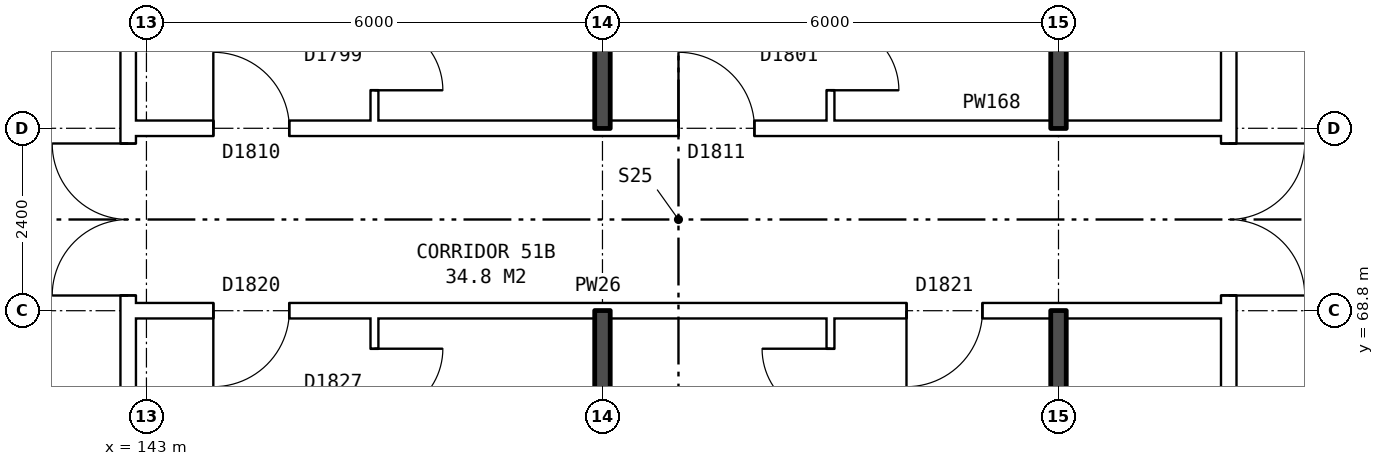
"""IFC4 building model, lengths in metres.
Left out: names, types, materials, properties, quantities, classifications, styles, units other than length and angle.
Written with IfcOpenShell. Run it as: python <this file> out.ifc"""

import sys

from ifc_helpers import new_model, si_unit, direction, frame, frame_2d, origin, place, context, subcontext, project, spatial, rectangle, extrude, element, fill, save


model = new_model("IFC4")
c1 = context("Model", 3, precision=1e-05, world=origin(), true_north=direction((0.0, 1.0)))
c2 = subcontext(c1, "Body", "Model", "MODEL_VIEW")
j1 = project(units=[si_unit("LENGTHUNIT", "METRE"), si_unit("PLANEANGLEUNIT", "RADIAN")], contexts=[c1])
p1 = place(None, origin())
s1 = spatial("IfcSite", under=j1, at=p1, CompositionType="ELEMENT")
p2 = place(p1, origin())
s2 = spatial("IfcBuilding", under=s1, at=p2, CompositionType="ELEMENT")
p3 = place(p2, frame((0.0, 0.0, 182.0)))
s3 = spatial("IfcBuildingStorey", under=s2, at=p3, CompositionType="ELEMENT", Elevation=182.0)
p4 = place(p3, frame((142.76, 63.9, 0.0), z_axis=(0.0, 0.0, 1.0), x_axis=(0.0, 1.0, 0.0)))
e1 = element("IfcWall", 1, at=p4, inside=s3, PredefinedType="PARTITIONING", context=c2, shape_type="SweptSolid", body=[
    extrude(rectangle(XDim=12.2, YDim=0.2, at=frame_2d((6.1, 0.0))), origin(), (0.0, 0.0, 1.0), 2.85),
])
p5 = place(p4, frame((5.1, 0.0, 0.0)))
e2 = element("IfcOpeningElement", 2, at=p5, cuts=e1, PredefinedType="OPENING", context=c2, shape_type="SweptSolid", body=[
    extrude(rectangle(XDim=2.0, YDim=2.1, at=frame_2d((1.0, 1.05))), frame((0.0, 0.11, 0.0), z_axis=(0.0, -1.0, 0.0), x_axis=(1.0, 0.0, 0.0)), (0.0, 0.0, 1.0), 0.22),
])
p6 = place(p3, frame((157.24, 63.9, 0.0), z_axis=(0.0, 0.0, 1.0), x_axis=(0.0, 1.0, 0.0)))
e3 = element("IfcWall", 3, at=p6, inside=s3, PredefinedType="PARTITIONING", context=c2, shape_type="SweptSolid", body=[
    extrude(rectangle(XDim=12.2, YDim=0.2, at=frame_2d((6.1, 0.0))), origin(), (0.0, 0.0, 1.0), 2.85),
])
p7 = place(p6, frame((5.1, 0.0, 0.0)))
e4 = element("IfcOpeningElement", 4, at=p7, cuts=e3, PredefinedType="OPENING", context=c2, shape_type="SweptSolid", body=[
    extrude(rectangle(XDim=2.0, YDim=2.1, at=frame_2d((1.0, 1.05))), frame((0.0, 0.11, 0.0), z_axis=(0.0, -1.0, 0.0), x_axis=(1.0, 0.0, 0.0)), (0.0, 0.0, 1.0), 0.22),
])
p8 = place(p3, frame((142.76, 68.8, 0.0), z_axis=(0.0, 0.0, 1.0), x_axis=(1.0, 0.0, 0.0)))
e5 = element("IfcWall", 5, at=p8, inside=s3, PredefinedType="PARTITIONING", context=c2, shape_type="SweptSolid", body=[
    extrude(rectangle(XDim=14.48, YDim=0.2, at=frame_2d((7.24, 0.0))), origin(), (0.0, 0.0, 1.0), 2.85),
])
p9 = place(p8, frame((1.12, 0.0, 0.0)))
e6 = element("IfcOpeningElement", 6, at=p9, cuts=e5, PredefinedType="OPENING", context=c2, shape_type="SweptSolid", body=[
    extrude(rectangle(XDim=1.0, YDim=2.1, at=frame_2d((0.5, 1.05))), frame((0.0, 0.11, 0.0), z_axis=(0.0, -1.0, 0.0), x_axis=(1.0, 0.0, 0.0)), (0.0, 0.0, 1.0), 0.22),
])
p10 = place(p8, frame((10.24, 0.0, 0.0)))
e7 = element("IfcOpeningElement", 7, at=p10, cuts=e5, PredefinedType="OPENING", context=c2, shape_type="SweptSolid", body=[
    extrude(rectangle(XDim=1.0, YDim=2.1, at=frame_2d((0.5, 1.05))), frame((0.0, 0.11, 0.0), z_axis=(0.0, -1.0, 0.0), x_axis=(1.0, 0.0, 0.0)), (0.0, 0.0, 1.0), 0.22),
])
p11 = place(p3, frame((142.76, 71.2, 0.0), z_axis=(0.0, 0.0, 1.0), x_axis=(1.0, 0.0, 0.0)))
e8 = element("IfcWall", 8, at=p11, inside=s3, PredefinedType="PARTITIONING", context=c2, shape_type="SweptSolid", body=[
    extrude(rectangle(XDim=14.48, YDim=0.2, at=frame_2d((7.24, 0.0))), origin(), (0.0, 0.0, 1.0), 2.85),
])
p12 = place(p11, frame((1.12, 0.0, 0.0)))
e9 = element("IfcOpeningElement", 9, at=p12, cuts=e8, PredefinedType="OPENING", context=c2, shape_type="SweptSolid", body=[
    extrude(rectangle(XDim=1.0, YDim=2.1, at=frame_2d((0.5, 1.05))), frame((0.0, 0.11, 0.0), z_axis=(0.0, -1.0, 0.0), x_axis=(1.0, 0.0, 0.0)), (0.0, 0.0, 1.0), 0.22),
])
p13 = place(p11, frame((7.24, 0.0, 0.0)))
e10 = element("IfcOpeningElement", 10, at=p13, cuts=e8, PredefinedType="OPENING", context=c2, shape_type="SweptSolid", body=[
    extrude(rectangle(XDim=1.0, YDim=2.1, at=frame_2d((0.5, 1.05))), frame((0.0, 0.11, 0.0), z_axis=(0.0, -1.0, 0.0), x_axis=(1.0, 0.0, 0.0)), (0.0, 0.0, 1.0), 0.22),
])
p14 = place(p3, frame((146.0, 54.36, 0.0), z_axis=(0.0, 0.0, 1.0), x_axis=(0.0, 1.0, 0.0)))
e11 = element("IfcWall", 11, at=p14, inside=s3, PredefinedType="PARTITIONING", context=c2, shape_type="SweptSolid", body=[
    extrude(rectangle(XDim=14.34, YDim=0.1, at=frame_2d((7.17, 0.0))), origin(), (0.0, 0.0, 1.0), 2.85),
])
p15 = place(p14, frame((7.7, 0.0, 0.0)))
e12 = element("IfcOpeningElement", 12, at=p15, cuts=e11, PredefinedType="OPENING", context=c2, shape_type="SweptSolid", body=[
    extrude(rectangle(XDim=0.9, YDim=2.1, at=frame_2d((0.45, 1.05))), frame((0.0, 0.06, 0.0), z_axis=(0.0, -1.0, 0.0), x_axis=(1.0, 0.0, 0.0)), (0.0, 0.0, 1.0), 0.12),
])
p16 = place(p14, frame((13.04, 0.0, 0.0)))
e13 = element("IfcOpeningElement", 13, at=p16, cuts=e11, PredefinedType="OPENING", context=c2, shape_type="SweptSolid", body=[
    extrude(rectangle(XDim=0.9, YDim=2.1, at=frame_2d((0.45, 1.05))), frame((0.0, 0.06, 0.0), z_axis=(0.0, -1.0, 0.0), x_axis=(1.0, 0.0, 0.0)), (0.0, 0.0, 1.0), 0.12),
])
p17 = place(p3, frame((146.0, 71.3, 0.0), z_axis=(0.0, 0.0, 1.0), x_axis=(0.0, 1.0, 0.0)))
e14 = element("IfcWall", 14, at=p17, inside=s3, PredefinedType="PARTITIONING", context=c2, shape_type="SweptSolid", body=[
    extrude(rectangle(XDim=14.34, YDim=0.1, at=frame_2d((7.17, 0.0))), origin(), (0.0, 0.0, 1.0), 2.85),
])
p18 = place(p17, frame((5.74, 0.0, 0.0)))
e15 = element("IfcOpeningElement", 15, at=p18, cuts=e14, PredefinedType="OPENING", context=c2, shape_type="SweptSolid", body=[
    extrude(rectangle(XDim=0.9, YDim=2.1, at=frame_2d((0.45, 1.05))), frame((0.0, 0.06, 0.0), z_axis=(0.0, -1.0, 0.0), x_axis=(1.0, 0.0, 0.0)), (0.0, 0.0, 1.0), 0.12),
])
p19 = place(p17, frame((0.4, 0.0, 0.0)))
e16 = element("IfcOpeningElement", 16, at=p19, cuts=e14, PredefinedType="OPENING", context=c2, shape_type="SweptSolid", body=[
    extrude(rectangle(XDim=0.9, YDim=2.1, at=frame_2d((0.45, 1.05))), frame((0.0, 0.06, 0.0), z_axis=(0.0, -1.0, 0.0), x_axis=(1.0, 0.0, 0.0)), (0.0, 0.0, 1.0), 0.12),
])
for number, where, z_axis, x_axis in (
    (17, (149.0, 54.36, 0.0), (0.0, 0.0, 1.0), (0.0, 1.0, 0.0)),
    (18, (149.0, 71.2, 0.0), (0.0, 0.0, 1.0), (0.0, 1.0, 0.0)),
):
    element("IfcWall", number, at=place(p3, frame(where, z_axis=z_axis, x_axis=x_axis)), inside=s3, PredefinedType="SOLIDWALL", context=c2, shape_type="SweptSolid", body=[
        extrude(rectangle(XDim=14.44, YDim=0.2, at=frame_2d((7.22, 0.0))), origin(), (0.0, 0.0, 1.0), 2.85),
    ])
p20 = place(p3, frame((152.0, 54.36, 0.0), z_axis=(0.0, 0.0, 1.0), x_axis=(0.0, 1.0, 0.0)))
e19 = element("IfcWall", 19, at=p20, inside=s3, PredefinedType="PARTITIONING", context=c2, shape_type="SweptSolid", body=[
    extrude(rectangle(XDim=14.34, YDim=0.1, at=frame_2d((7.17, 0.0))), origin(), (0.0, 0.0, 1.0), 2.85),
])
p21 = place(p20, frame((5.5, 0.0, 0.0)))
e20 = element("IfcOpeningElement", 20, at=p21, cuts=e19, PredefinedType="OPENING", context=c2, shape_type="SweptSolid", body=[
    extrude(rectangle(XDim=0.9, YDim=2.1, at=frame_2d((0.45, 1.05))), frame((0.0, 0.06, 0.0), z_axis=(0.0, -1.0, 0.0), x_axis=(1.0, 0.0, 0.0)), (0.0, 0.0, 1.0), 0.12),
])
p22 = place(p20, frame((13.04, 0.0, 0.0)))
e21 = element("IfcOpeningElement", 21, at=p22, cuts=e19, PredefinedType="OPENING", context=c2, shape_type="SweptSolid", body=[
    extrude(rectangle(XDim=0.9, YDim=2.1, at=frame_2d((0.45, 1.05))), frame((0.0, 0.06, 0.0), z_axis=(0.0, -1.0, 0.0), x_axis=(1.0, 0.0, 0.0)), (0.0, 0.0, 1.0), 0.12),
])
p23 = place(p3, frame((152.0, 71.3, 0.0), z_axis=(0.0, 0.0, 1.0), x_axis=(0.0, 1.0, 0.0)))
e22 = element("IfcWall", 22, at=p23, inside=s3, PredefinedType="PARTITIONING", context=c2, shape_type="SweptSolid", body=[
    extrude(rectangle(XDim=14.34, YDim=0.1, at=frame_2d((7.17, 0.0))), origin(), (0.0, 0.0, 1.0), 2.85),
])
p24 = place(p23, frame((6.74, 0.0, 0.0)))
e23 = element("IfcOpeningElement", 23, at=p24, cuts=e22, PredefinedType="OPENING", context=c2, shape_type="SweptSolid", body=[
    extrude(rectangle(XDim=0.9, YDim=2.1, at=frame_2d((0.45, 1.05))), frame((0.0, 0.06, 0.0), z_axis=(0.0, -1.0, 0.0), x_axis=(1.0, 0.0, 0.0)), (0.0, 0.0, 1.0), 0.12),
])
p25 = place(p23, frame((0.4, 0.0, 0.0)))
e24 = element("IfcOpeningElement", 24, at=p25, cuts=e22, PredefinedType="OPENING", context=c2, shape_type="SweptSolid", body=[
    extrude(rectangle(XDim=0.9, YDim=2.1, at=frame_2d((0.45, 1.05))), frame((0.0, 0.06, 0.0), z_axis=(0.0, -1.0, 0.0), x_axis=(1.0, 0.0, 0.0)), (0.0, 0.0, 1.0), 0.12),
])
for number, where, z_axis, x_axis in (
    (25, (155.0, 63.8, 0.0), (0.0, 0.0, 1.0), (0.0, 1.0, 0.0)),
    (26, (155.0, 71.2, 0.0), (0.0, 0.0, 1.0), (0.0, 1.0, 0.0)),
):
    element("IfcWall", number, at=place(p3, frame(where, z_axis=z_axis, x_axis=x_axis)), inside=s3, PredefinedType="SOLIDWALL", context=c2, shape_type="SweptSolid", body=[
        extrude(rectangle(XDim=5.0, YDim=0.2, at=frame_2d((2.5, 0.0))), origin(), (0.0, 0.0, 1.0), 2.85),
    ])
p26 = place(p5, origin())
e27 = element("IfcDoor", 27, at=p26, inside=s3, OperationType="DOUBLE_DOOR_SINGLE_SWING", PredefinedType="DOOR", context=c2, shape_type="SweptSolid", body=[
    extrude(rectangle(XDim=2.0, YDim=2.1, at=frame_2d((1.0, 1.05))), frame((0.0, 0.025, 0.0), z_axis=(0.0, -1.0, 0.0), x_axis=(1.0, 0.0, 0.0)), (0.0, 0.0, 1.0), 0.05),
])
fill(e2, e27)
p27 = place(p7, frame((2.0, 0.0, 0.0), z_axis=(0.0, 0.0, 1.0), x_axis=(-1.0, 0.0, 0.0)))
e28 = element("IfcDoor", 28, at=p27, inside=s3, OperationType="DOUBLE_DOOR_SINGLE_SWING", PredefinedType="DOOR", context=c2, shape_type="SweptSolid", body=[
    extrude(rectangle(XDim=2.0, YDim=2.1, at=frame_2d((1.0, 1.05))), frame((0.0, 0.025, 0.0), z_axis=(0.0, -1.0, 0.0), x_axis=(1.0, 0.0, 0.0)), (0.0, 0.0, 1.0), 0.05),
])
fill(e4, e28)
p28 = place(p9, frame((1.0, 0.0, 0.0), z_axis=(0.0, 0.0, 1.0), x_axis=(-1.0, 0.0, 0.0)))
e29 = element("IfcDoor", 29, at=p28, inside=s3, OperationType="SINGLE_SWING_RIGHT", PredefinedType="DOOR", context=c2, shape_type="SweptSolid", body=[
    extrude(rectangle(XDim=1.0, YDim=2.1, at=frame_2d((0.5, 1.05))), frame((0.0, 0.025, 0.0), z_axis=(0.0, -1.0, 0.0), x_axis=(1.0, 0.0, 0.0)), (0.0, 0.0, 1.0), 0.05),
])
fill(e6, e29)
p29 = place(p16, frame((0.9, 0.0, 0.0), z_axis=(0.0, 0.0, 1.0), x_axis=(-1.0, 0.0, 0.0)))
e30 = element("IfcDoor", 30, at=p29, inside=s3, OperationType="SINGLE_SWING_LEFT", PredefinedType="DOOR", context=c2, shape_type="SweptSolid", body=[
    extrude(rectangle(XDim=0.9, YDim=2.1, at=frame_2d((0.45, 1.05))), frame((0.0, 0.025, 0.0), z_axis=(0.0, -1.0, 0.0), x_axis=(1.0, 0.0, 0.0)), (0.0, 0.0, 1.0), 0.05),
])
fill(e13, e30)
p30 = place(p10, frame((1.0, 0.0, 0.0), z_axis=(0.0, 0.0, 1.0), x_axis=(-1.0, 0.0, 0.0)))
e31 = element("IfcDoor", 31, at=p30, inside=s3, OperationType="SINGLE_SWING_RIGHT", PredefinedType="DOOR", context=c2, shape_type="SweptSolid", body=[
    extrude(rectangle(XDim=1.0, YDim=2.1, at=frame_2d((0.5, 1.05))), frame((0.0, 0.025, 0.0), z_axis=(0.0, -1.0, 0.0), x_axis=(1.0, 0.0, 0.0)), (0.0, 0.0, 1.0), 0.05),
])
fill(e7, e31)
p31 = place(p22, origin())
e32 = element("IfcDoor", 32, at=p31, inside=s3, OperationType="SINGLE_SWING_RIGHT", PredefinedType="DOOR", context=c2, shape_type="SweptSolid", body=[
    extrude(rectangle(XDim=0.9, YDim=2.1, at=frame_2d((0.45, 1.05))), frame((0.0, 0.025, 0.0), z_axis=(0.0, -1.0, 0.0), x_axis=(1.0, 0.0, 0.0)), (0.0, 0.0, 1.0), 0.05),
])
fill(e21, e32)
p32 = place(p12, origin())
e33 = element("IfcDoor", 33, at=p32, inside=s3, OperationType="SINGLE_SWING_LEFT", PredefinedType="DOOR", context=c2, shape_type="SweptSolid", body=[
    extrude(rectangle(XDim=1.0, YDim=2.1, at=frame_2d((0.5, 1.05))), frame((0.0, 0.025, 0.0), z_axis=(0.0, -1.0, 0.0), x_axis=(1.0, 0.0, 0.0)), (0.0, 0.0, 1.0), 0.05),
])
fill(e9, e33)
p33 = place(p19, frame((0.9, 0.0, 0.0), z_axis=(0.0, 0.0, 1.0), x_axis=(-1.0, 0.0, 0.0)))
e34 = element("IfcDoor", 34, at=p33, inside=s3, OperationType="SINGLE_SWING_RIGHT", PredefinedType="DOOR", context=c2, shape_type="SweptSolid", body=[
    extrude(rectangle(XDim=0.9, YDim=2.1, at=frame_2d((0.45, 1.05))), frame((0.0, 0.025, 0.0), z_axis=(0.0, -1.0, 0.0), x_axis=(1.0, 0.0, 0.0)), (0.0, 0.0, 1.0), 0.05),
])
fill(e16, e34)
p34 = place(p13, origin())
e35 = element("IfcDoor", 35, at=p34, inside=s3, OperationType="SINGLE_SWING_LEFT", PredefinedType="DOOR", context=c2, shape_type="SweptSolid", body=[
    extrude(rectangle(XDim=1.0, YDim=2.1, at=frame_2d((0.5, 1.05))), frame((0.0, 0.025, 0.0), z_axis=(0.0, -1.0, 0.0), x_axis=(1.0, 0.0, 0.0)), (0.0, 0.0, 1.0), 0.05),
])
fill(e10, e35)
p35 = place(p25, frame((0.9, 0.0, 0.0), z_axis=(0.0, 0.0, 1.0), x_axis=(-1.0, 0.0, 0.0)))
e36 = element("IfcDoor", 36, at=p35, inside=s3, OperationType="SINGLE_SWING_RIGHT", PredefinedType="DOOR", context=c2, shape_type="SweptSolid", body=[
    extrude(rectangle(XDim=0.9, YDim=2.1, at=frame_2d((0.45, 1.05))), frame((0.0, 0.025, 0.0), z_axis=(0.0, -1.0, 0.0), x_axis=(1.0, 0.0, 0.0)), (0.0, 0.0, 1.0), 0.05),
])
fill(e24, e36)
save(model, sys.argv[1])
